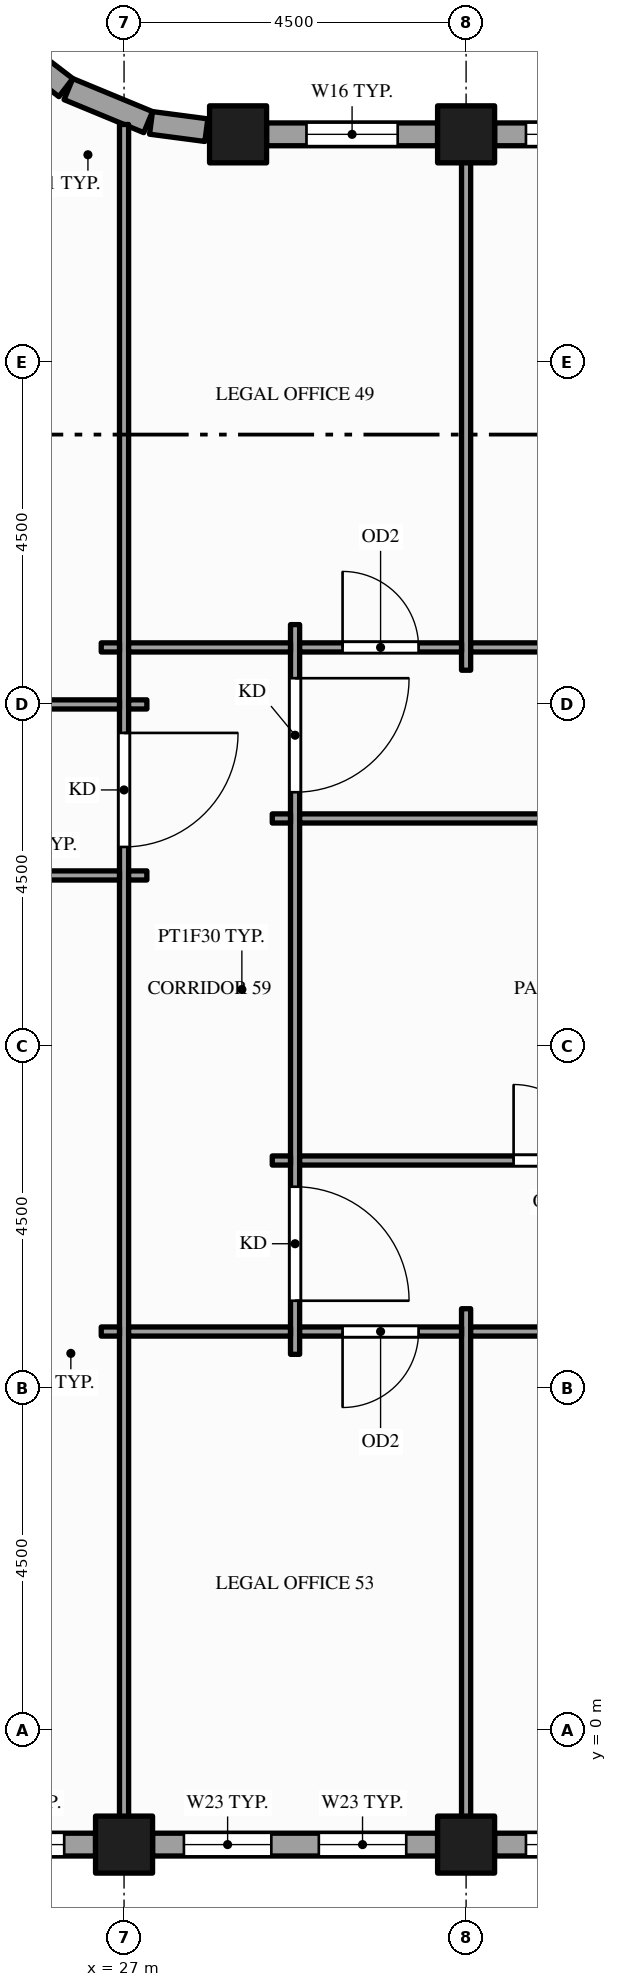
"""IFC4 building model, lengths in metres.
Left out: names, types, materials, properties, quantities, classifications, styles, units other than length and angle.
Written with IfcOpenShell. Run it as: python <this file> out.ifc"""

import sys

from ifc_helpers import new_model, si_unit, direction, frame, frame_2d, origin, origin_2d, place, context, subcontext, project, spatial, rectangle, hollow_rectangle, extrude, element, fill, save


model = new_model("IFC4")
c1 = context("Model", 3, precision=1e-05, world=origin(), true_north=direction((0.0, 1.0)))
c2 = subcontext(c1, "Body", "Model", "MODEL_VIEW")
j1 = project(units=[si_unit("LENGTHUNIT", "METRE"), si_unit("PLANEANGLEUNIT", "RADIAN")], contexts=[c1])
p1 = place(None, origin())
s1 = spatial("IfcSite", under=j1, at=p1, CompositionType="ELEMENT")
p2 = place(p1, origin())
s2 = spatial("IfcBuilding", under=s1, at=p2, CompositionType="ELEMENT")
p3 = place(p2, frame((0.0, 0.0, 211.0)))
s3 = spatial("IfcBuildingStorey", under=s2, at=p3, CompositionType="ELEMENT", Elevation=211.0)
for number, where, z_axis, x_axis in (
    (1, (27.0, -1.5, -0.15), (0.0, 0.0, 1.0), (1.0, 0.0, 0.0)),
    (2, (28.5, 21.0, -0.15), (0.0, 0.0, 1.0), (1.0, 0.0, 0.0)),
    (3, (31.5, -1.5, -0.15), (0.0, 0.0, 1.0), (1.0, 0.0, 0.0)),
    (4, (31.5, 21.0, -0.15), (0.0, 0.0, 1.0), (1.0, 0.0, 0.0)),
):
    element("IfcColumn", number, at=place(p3, frame(where, z_axis=z_axis, x_axis=x_axis)), inside=s3, PredefinedType="COLUMN", context=c2, shape_type="SweptSolid", body=[
        extrude(hollow_rectangle(XDim=0.75, YDim=0.75, WallThickness=0.036, at=origin_2d()), origin(), (0.0, 0.0, 1.0), 4.0),
    ])
p4 = place(p3, frame((22.875, -1.5, 0.0), z_axis=(0.0, 0.0, 1.0), x_axis=(1.0, 0.0, 0.0)))
e5 = element("IfcWall", 5, at=p4, inside=s3, PredefinedType="STANDARD", context=c2, shape_type="SweptSolid", body=[
    extrude(rectangle(XDim=3.75, YDim=0.3, at=frame_2d((1.875, 0.0))), origin(), (0.0, 0.0, 1.0), 2.76),
])
p5 = place(p4, frame((0.413, 0.0, 0.9)))
e6 = element("IfcOpeningElement", 6, at=p5, cuts=e5, PredefinedType="OPENING", context=c2, shape_type="SweptSolid", body=[
    extrude(rectangle(XDim=1.15, YDim=1.5, at=frame_2d((0.575, 0.75))), frame((0.0, 0.16, 0.0), z_axis=(0.0, -1.0, 0.0), x_axis=(1.0, 0.0, 0.0)), (0.0, 0.0, 1.0), 0.32),
])
p6 = place(p4, frame((2.188, 0.0, 0.9)))
e7 = element("IfcOpeningElement", 7, at=p6, cuts=e5, PredefinedType="OPENING", context=c2, shape_type="SweptSolid", body=[
    extrude(rectangle(XDim=1.15, YDim=1.5, at=frame_2d((0.575, 0.75))), frame((0.0, 0.16, 0.0), z_axis=(0.0, -1.0, 0.0), x_axis=(1.0, 0.0, 0.0)), (0.0, 0.0, 1.0), 0.32),
])
p7 = place(p3, frame((27.375, -1.5, 0.0), z_axis=(0.0, 0.0, 1.0), x_axis=(1.0, 0.0, 0.0)))
e8 = element("IfcWall", 8, at=p7, inside=s3, PredefinedType="STANDARD", context=c2, shape_type="SweptSolid", body=[
    extrude(rectangle(XDim=3.75, YDim=0.3, at=frame_2d((1.875, 0.0))), origin(), (0.0, 0.0, 1.0), 2.87),
])
p8 = place(p7, frame((0.413, 0.0, 0.9)))
e9 = element("IfcOpeningElement", 9, at=p8, cuts=e8, PredefinedType="OPENING", context=c2, shape_type="SweptSolid", body=[
    extrude(rectangle(XDim=1.15, YDim=1.75, at=frame_2d((0.575, 0.875))), frame((0.0, 0.16, 0.0), z_axis=(0.0, -1.0, 0.0), x_axis=(1.0, 0.0, 0.0)), (0.0, 0.0, 1.0), 0.32),
])
p9 = place(p7, frame((2.188, 0.0, 0.9)))
e10 = element("IfcOpeningElement", 10, at=p9, cuts=e8, PredefinedType="OPENING", context=c2, shape_type="SweptSolid", body=[
    extrude(rectangle(XDim=1.15, YDim=1.75, at=frame_2d((0.575, 0.875))), frame((0.0, 0.16, 0.0), z_axis=(0.0, -1.0, 0.0), x_axis=(1.0, 0.0, 0.0)), (0.0, 0.0, 1.0), 0.32),
])
p10 = place(p3, frame((31.875, -1.5, 0.0), z_axis=(0.0, 0.0, 1.0), x_axis=(1.0, 0.0, 0.0)))
e11 = element("IfcWall", 11, at=p10, inside=s3, PredefinedType="STANDARD", context=c2, shape_type="SweptSolid", body=[
    extrude(rectangle(XDim=3.75, YDim=0.3, at=frame_2d((1.875, 0.0))), origin(), (0.0, 0.0, 1.0), 2.87),
])
p11 = place(p10, frame((0.413, 0.0, 0.9)))
e12 = element("IfcOpeningElement", 12, at=p11, cuts=e11, PredefinedType="OPENING", context=c2, shape_type="SweptSolid", body=[
    extrude(rectangle(XDim=1.15, YDim=1.75, at=frame_2d((0.575, 0.875))), frame((0.0, 0.16, 0.0), z_axis=(0.0, -1.0, 0.0), x_axis=(1.0, 0.0, 0.0)), (0.0, 0.0, 1.0), 0.32),
])
p12 = place(p10, frame((2.188, 0.0, 0.9)))
e13 = element("IfcOpeningElement", 13, at=p12, cuts=e11, PredefinedType="OPENING", context=c2, shape_type="SweptSolid", body=[
    extrude(rectangle(XDim=1.15, YDim=1.75, at=frame_2d((0.575, 0.875))), frame((0.0, 0.16, 0.0), z_axis=(0.0, -1.0, 0.0), x_axis=(1.0, 0.0, 0.0)), (0.0, 0.0, 1.0), 0.32),
])
p13 = place(p3, frame((35.625, 21.0, 0.0), z_axis=(0.0, 0.0, 1.0), x_axis=(-1.0, 0.0, 0.0)))
e14 = element("IfcWall", 14, at=p13, inside=s3, PredefinedType="STANDARD", context=c2, shape_type="SweptSolid", body=[
    extrude(rectangle(XDim=3.75, YDim=0.3, at=frame_2d((1.875, 0.0))), origin(), (0.0, 0.0, 1.0), 2.87),
])
p14 = place(p13, frame((0.413, 0.0, 0.9)))
e15 = element("IfcOpeningElement", 15, at=p14, cuts=e14, PredefinedType="OPENING", context=c2, shape_type="SweptSolid", body=[
    extrude(rectangle(XDim=1.15, YDim=1.75, at=frame_2d((0.575, 0.875))), frame((0.0, 0.16, 0.0), z_axis=(0.0, -1.0, 0.0), x_axis=(1.0, 0.0, 0.0)), (0.0, 0.0, 1.0), 0.32),
])
p15 = place(p13, frame((2.188, 0.0, 0.9)))
e16 = element("IfcOpeningElement", 16, at=p15, cuts=e14, PredefinedType="OPENING", context=c2, shape_type="SweptSolid", body=[
    extrude(rectangle(XDim=1.15, YDim=1.75, at=frame_2d((0.575, 0.875))), frame((0.0, 0.16, 0.0), z_axis=(0.0, -1.0, 0.0), x_axis=(1.0, 0.0, 0.0)), (0.0, 0.0, 1.0), 0.32),
])
p16 = place(p3, frame((31.125, 21.0, 0.0), z_axis=(0.0, 0.0, 1.0), x_axis=(-1.0, 0.0, 0.0)))
e17 = element("IfcWall", 17, at=p16, inside=s3, PredefinedType="STANDARD", context=c2, shape_type="SweptSolid", body=[
    extrude(rectangle(XDim=2.25, YDim=0.3, at=frame_2d((1.125, 0.0))), origin(), (0.0, 0.0, 1.0), 2.87),
])
p17 = place(p16, frame((0.525, 0.0, 0.9)))
e18 = element("IfcOpeningElement", 18, at=p17, cuts=e17, PredefinedType="OPENING", context=c2, shape_type="SweptSolid", body=[
    extrude(rectangle(XDim=1.2, YDim=1.75, at=frame_2d((0.6, 0.875))), frame((0.0, 0.16, 0.0), z_axis=(0.0, -1.0, 0.0), x_axis=(1.0, 0.0, 0.0)), (0.0, 0.0, 1.0), 0.32),
])
p18 = place(p3, frame((28.083, 21.055, 0.0), z_axis=(0.0, 0.0, 1.0), x_axis=(-0.99142711513, 0.130660917588, 0.0)))
e19 = element("IfcWall", 19, at=p18, inside=s3, PredefinedType="STANDARD", context=c2, shape_type="SweptSolid", body=[
    extrude(rectangle(XDim=0.734, YDim=0.3, at=frame_2d((0.367, 0.0))), origin(), (0.0, 0.0, 1.0), 3.157),
])
p19 = place(p3, frame((27.317, 21.161, 0.0), z_axis=(0.0, 0.0, 1.0), x_axis=(-0.923914616768, 0.382598720491, 0.0)))
e20 = element("IfcWall", 20, at=p19, inside=s3, PredefinedType="STANDARD", context=c2, shape_type="SweptSolid", body=[
    extrude(rectangle(XDim=1.135, YDim=0.3, at=frame_2d((0.568, 0.0))), origin(), (0.0, 0.0, 1.0), 2.87),
])
p20 = place(p3, frame((26.234, 21.615, 0.0), z_axis=(0.0, 0.0, 1.0), x_axis=(-0.793575131083, 0.608472276547, 0.0)))
e21 = element("IfcWall", 21, at=p20, inside=s3, PredefinedType="STANDARD", context=c2, shape_type="SweptSolid", body=[
    extrude(rectangle(XDim=0.629, YDim=0.3, at=frame_2d((0.314, 0.0))), origin(), (0.0, 0.0, 1.0), 3.157),
])
p21 = place(p3, frame((27.0, -1.35, 0.0), z_axis=(0.0, 0.0, 1.0), x_axis=(0.0, 1.0, 0.0)))
e22 = element("IfcWall", 22, at=p21, inside=s3, PredefinedType="PARTITIONING", context=c2, shape_type="SweptSolid", body=[
    extrude(rectangle(XDim=22.48, YDim=0.12, at=frame_2d((11.24, 0.0))), origin(), (0.0, 0.0, 1.0), 2.87),
])
p22 = place(p21, frame((12.975, 0.0, 0.0)))
e23 = element("IfcOpeningElement", 23, at=p22, cuts=e22, PredefinedType="OPENING", context=c2, shape_type="SweptSolid", body=[
    extrude(rectangle(XDim=1.5, YDim=2.1, at=frame_2d((0.75, 1.05))), frame((0.0, 0.07, 0.0), z_axis=(0.0, -1.0, 0.0), x_axis=(1.0, 0.0, 0.0)), (0.0, 0.0, 1.0), 0.14),
])
p23 = place(p3, frame((29.25, 4.95, 0.0), z_axis=(0.0, 0.0, 1.0), x_axis=(0.0, 1.0, 0.0)))
e24 = element("IfcWall", 24, at=p23, inside=s3, PredefinedType="PARTITIONING", context=c2, shape_type="SweptSolid", body=[
    extrude(rectangle(XDim=9.6, YDim=0.12, at=frame_2d((4.8, 0.0))), origin(), (0.0, 0.0, 1.0), 2.87),
])
p24 = place(p23, frame((0.705, 0.0, 0.0)))
e25 = element("IfcOpeningElement", 25, at=p24, cuts=e24, PredefinedType="OPENING", context=c2, shape_type="SweptSolid", body=[
    extrude(rectangle(XDim=1.5, YDim=2.1, at=frame_2d((0.75, 1.05))), frame((0.0, 0.07, 0.0), z_axis=(0.0, -1.0, 0.0), x_axis=(1.0, 0.0, 0.0)), (0.0, 0.0, 1.0), 0.14),
])
p25 = place(p23, frame((7.395, 0.0, 0.0)))
e26 = element("IfcOpeningElement", 26, at=p25, cuts=e24, PredefinedType="OPENING", context=c2, shape_type="SweptSolid", body=[
    extrude(rectangle(XDim=1.5, YDim=2.1, at=frame_2d((0.75, 1.05))), frame((0.0, 0.07, 0.0), z_axis=(0.0, -1.0, 0.0), x_axis=(1.0, 0.0, 0.0)), (0.0, 0.0, 1.0), 0.14),
])
for number, where, z_axis, x_axis in (
    (27, (31.5, -1.35, 0.0), (0.0, 0.0, 1.0), (0.0, 1.0, 0.0)),
    (28, (31.5, 13.95, 0.0), (0.0, 0.0, 1.0), (0.0, 1.0, 0.0)),
):
    element("IfcWall", number, at=place(p3, frame(where, z_axis=z_axis, x_axis=x_axis)), inside=s3, PredefinedType="PARTITIONING", context=c2, shape_type="SweptSolid", body=[
        extrude(rectangle(XDim=6.9, YDim=0.12, at=frame_2d((3.45, 0.0))), origin(), (0.0, 0.0, 1.0), 2.87),
    ])
p26 = place(p3, frame((26.7, 5.25, 0.0), z_axis=(0.0, 0.0, 1.0), x_axis=(1.0, 0.0, 0.0)))
e29 = element("IfcWall", 29, at=p26, inside=s3, PredefinedType="PARTITIONING", context=c2, shape_type="SweptSolid", body=[
    extrude(rectangle(XDim=0.24, YDim=0.12, at=frame_2d((0.12, 0.0))), origin(), (0.0, 0.0, 1.0), 2.87),
])
p27 = place(p3, frame((27.06, 5.25, 0.0), z_axis=(0.0, 0.0, 1.0), x_axis=(1.0, 0.0, 0.0)))
e30 = element("IfcWall", 30, at=p27, inside=s3, PredefinedType="PARTITIONING", context=c2, shape_type="SweptSolid", body=[
    extrude(rectangle(XDim=2.13, YDim=0.12, at=frame_2d((1.065, 0.0))), origin(), (0.0, 0.0, 1.0), 2.87),
])
p28 = place(p3, frame((29.31, 5.25, 0.0), z_axis=(0.0, 0.0, 1.0), x_axis=(1.0, 0.0, 0.0)))
e31 = element("IfcWall", 31, at=p28, inside=s3, PredefinedType="PARTITIONING", context=c2, shape_type="SweptSolid", body=[
    extrude(rectangle(XDim=2.13, YDim=0.12, at=frame_2d((1.065, 0.0))), origin(), (0.0, 0.0, 1.0), 2.87),
])
p29 = place(p28, frame((0.565, 0.0, 0.0)))
e32 = element("IfcOpeningElement", 32, at=p29, cuts=e31, PredefinedType="OPENING", context=c2, shape_type="SweptSolid", body=[
    extrude(rectangle(XDim=1.0, YDim=2.1, at=frame_2d((0.5, 1.05))), frame((0.0, 0.07, 0.0), z_axis=(0.0, -1.0, 0.0), x_axis=(1.0, 0.0, 0.0)), (0.0, 0.0, 1.0), 0.14),
])
p30 = place(p3, frame((31.56, 5.25, 0.0), z_axis=(0.0, 0.0, 1.0), x_axis=(1.0, 0.0, 0.0)))
e33 = element("IfcWall", 33, at=p30, inside=s3, PredefinedType="PARTITIONING", context=c2, shape_type="SweptSolid", body=[
    extrude(rectangle(XDim=4.38, YDim=0.12, at=frame_2d((2.19, 0.0))), origin(), (0.0, 0.0, 1.0), 2.87),
])
p31 = place(p30, frame((1.69, 0.0, 0.0)))
e34 = element("IfcOpeningElement", 34, at=p31, cuts=e33, PredefinedType="OPENING", context=c2, shape_type="SweptSolid", body=[
    extrude(rectangle(XDim=1.0, YDim=2.1, at=frame_2d((0.5, 1.05))), frame((0.0, 0.07, 0.0), z_axis=(0.0, -1.0, 0.0), x_axis=(1.0, 0.0, 0.0)), (0.0, 0.0, 1.0), 0.14),
])
p32 = place(p3, frame((28.95, 7.5, 0.0), z_axis=(0.0, 0.0, 1.0), x_axis=(1.0, 0.0, 0.0)))
e35 = element("IfcWall", 35, at=p32, inside=s3, PredefinedType="PARTITIONING", context=c2, shape_type="SweptSolid", body=[
    extrude(rectangle(XDim=0.24, YDim=0.12, at=frame_2d((0.12, 0.0))), origin(), (0.0, 0.0, 1.0), 2.87),
])
p33 = place(p3, frame((29.31, 7.5, 0.0), z_axis=(0.0, 0.0, 1.0), x_axis=(1.0, 0.0, 0.0)))
e36 = element("IfcWall", 36, at=p33, inside=s3, PredefinedType="PARTITIONING", context=c2, shape_type="SweptSolid", body=[
    extrude(rectangle(XDim=6.63, YDim=0.12, at=frame_2d((3.315, 0.0))), origin(), (0.0, 0.0, 1.0), 2.87),
])
p34 = place(p33, frame((2.815, 0.0, 0.0)))
e37 = element("IfcOpeningElement", 37, at=p34, cuts=e36, PredefinedType="OPENING", context=c2, shape_type="SweptSolid", body=[
    extrude(rectangle(XDim=1.0, YDim=2.1, at=frame_2d((0.5, 1.05))), frame((0.0, 0.07, 0.0), z_axis=(0.0, -1.0, 0.0), x_axis=(1.0, 0.0, 0.0)), (0.0, 0.0, 1.0), 0.14),
])
p35 = place(p3, frame((20.31, 11.25, 0.0), z_axis=(0.0, 0.0, 1.0), x_axis=(1.0, 0.0, 0.0)))
e38 = element("IfcWall", 38, at=p35, inside=s3, PredefinedType="PARTITIONING", context=c2, shape_type="SweptSolid", body=[
    extrude(rectangle(XDim=6.63, YDim=0.12, at=frame_2d((3.315, 0.0))), origin(), (0.0, 0.0, 1.0), 2.76),
])
p36 = place(p35, frame((2.865, 0.0, 0.0)))
e39 = element("IfcOpeningElement", 39, at=p36, cuts=e38, PredefinedType="OPENING", context=c2, shape_type="SweptSolid", body=[
    extrude(rectangle(XDim=0.9, YDim=2.1, at=frame_2d((0.45, 1.05))), frame((0.0, 0.07, 0.0), z_axis=(0.0, -1.0, 0.0), x_axis=(1.0, 0.0, 0.0)), (0.0, 0.0, 1.0), 0.14),
])
for number, where, z_axis, x_axis in (
    (40, (27.06, 11.25, 0.0), (0.0, 0.0, 1.0), (1.0, 0.0, 0.0)),
    (41, (28.95, 12.0, 0.0), (0.0, 0.0, 1.0), (1.0, 0.0, 0.0)),
):
    element("IfcWall", number, at=place(p3, frame(where, z_axis=z_axis, x_axis=x_axis)), inside=s3, PredefinedType="PARTITIONING", context=c2, shape_type="SweptSolid", body=[
        extrude(rectangle(XDim=0.24, YDim=0.12, at=frame_2d((0.12, 0.0))), origin(), (0.0, 0.0, 1.0), 2.87),
    ])
p37 = place(p3, frame((29.31, 12.0, 0.0), z_axis=(0.0, 0.0, 1.0), x_axis=(1.0, 0.0, 0.0)))
e42 = element("IfcWall", 42, at=p37, inside=s3, PredefinedType="PARTITIONING", context=c2, shape_type="SweptSolid", body=[
    extrude(rectangle(XDim=6.63, YDim=0.12, at=frame_2d((3.315, 0.0))), origin(), (0.0, 0.0, 1.0), 2.87),
])
p38 = place(p3, frame((13.56, 13.5, 0.0), z_axis=(0.0, 0.0, 1.0), x_axis=(1.0, 0.0, 0.0)))
e43 = element("IfcWall", 43, at=p38, inside=s3, PredefinedType="PARTITIONING", context=c2, shape_type="SweptSolid", body=[
    extrude(rectangle(XDim=13.38, YDim=0.12, at=frame_2d((6.69, 0.0))), origin(), (0.0, 0.0, 1.0), 2.76),
])
p39 = place(p38, frame((3.54, 0.0, 0.0)))
e44 = element("IfcOpeningElement", 44, at=p39, cuts=e43, PredefinedType="OPENING", context=c2, shape_type="SweptSolid", body=[
    extrude(rectangle(XDim=1.8, YDim=2.1, at=frame_2d((0.9, 1.05))), frame((0.0, 0.07, 0.0), z_axis=(0.0, -1.0, 0.0), x_axis=(1.0, 0.0, 0.0)), (0.0, 0.0, 1.0), 0.14),
])
for number, where, z_axis, x_axis in (
    (45, (27.06, 13.5, 0.0), (0.0, 0.0, 1.0), (1.0, 0.0, 0.0)),
    (46, (26.7, 14.25, 0.0), (0.0, 0.0, 1.0), (1.0, 0.0, 0.0)),
):
    element("IfcWall", number, at=place(p3, frame(where, z_axis=z_axis, x_axis=x_axis)), inside=s3, PredefinedType="PARTITIONING", context=c2, shape_type="SweptSolid", body=[
        extrude(rectangle(XDim=0.24, YDim=0.12, at=frame_2d((0.12, 0.0))), origin(), (0.0, 0.0, 1.0), 2.87),
    ])
p40 = place(p3, frame((27.06, 14.25, 0.0), z_axis=(0.0, 0.0, 1.0), x_axis=(1.0, 0.0, 0.0)))
e47 = element("IfcWall", 47, at=p40, inside=s3, PredefinedType="PARTITIONING", context=c2, shape_type="SweptSolid", body=[
    extrude(rectangle(XDim=2.13, YDim=0.12, at=frame_2d((1.065, 0.0))), origin(), (0.0, 0.0, 1.0), 2.87),
])
p41 = place(p3, frame((29.31, 14.25, 0.0), z_axis=(0.0, 0.0, 1.0), x_axis=(1.0, 0.0, 0.0)))
e48 = element("IfcWall", 48, at=p41, inside=s3, PredefinedType="PARTITIONING", context=c2, shape_type="SweptSolid", body=[
    extrude(rectangle(XDim=2.13, YDim=0.12, at=frame_2d((1.065, 0.0))), origin(), (0.0, 0.0, 1.0), 2.87),
])
p42 = place(p41, frame((0.565, 0.0, 0.0)))
e49 = element("IfcOpeningElement", 49, at=p42, cuts=e48, PredefinedType="OPENING", context=c2, shape_type="SweptSolid", body=[
    extrude(rectangle(XDim=1.0, YDim=2.1, at=frame_2d((0.5, 1.05))), frame((0.0, 0.07, 0.0), z_axis=(0.0, -1.0, 0.0), x_axis=(1.0, 0.0, 0.0)), (0.0, 0.0, 1.0), 0.14),
])
p43 = place(p3, frame((31.56, 14.25, 0.0), z_axis=(0.0, 0.0, 1.0), x_axis=(1.0, 0.0, 0.0)))
e50 = element("IfcWall", 50, at=p43, inside=s3, PredefinedType="PARTITIONING", context=c2, shape_type="SweptSolid", body=[
    extrude(rectangle(XDim=4.38, YDim=0.12, at=frame_2d((2.19, 0.0))), origin(), (0.0, 0.0, 1.0), 2.87),
])
p44 = place(p43, frame((1.69, 0.0, 0.0)))
e51 = element("IfcOpeningElement", 51, at=p44, cuts=e50, PredefinedType="OPENING", context=c2, shape_type="SweptSolid", body=[
    extrude(rectangle(XDim=1.0, YDim=2.1, at=frame_2d((0.5, 1.05))), frame((0.0, 0.07, 0.0), z_axis=(0.0, -1.0, 0.0), x_axis=(1.0, 0.0, 0.0)), (0.0, 0.0, 1.0), 0.14),
])
p45 = place(p6, origin())
e52 = element("IfcWindow", 52, at=p45, inside=s3, PartitioningType="SINGLE_PANEL", PredefinedType="WINDOW", context=c2, shape_type="SweptSolid", body=[
    extrude(rectangle(XDim=1.15, YDim=1.5, at=frame_2d((0.575, 0.75))), frame((0.0, 0.03, 0.0), z_axis=(0.0, -1.0, 0.0), x_axis=(1.0, 0.0, 0.0)), (0.0, 0.0, 1.0), 0.06),
])
fill(e7, e52)
p46 = place(p8, origin())
e53 = element("IfcWindow", 53, at=p46, inside=s3, PartitioningType="SINGLE_PANEL", PredefinedType="WINDOW", context=c2, shape_type="SweptSolid", body=[
    extrude(rectangle(XDim=1.15, YDim=1.75, at=frame_2d((0.575, 0.875))), frame((0.0, 0.03, 0.0), z_axis=(0.0, -1.0, 0.0), x_axis=(1.0, 0.0, 0.0)), (0.0, 0.0, 1.0), 0.06),
])
fill(e9, e53)
p47 = place(p9, origin())
e54 = element("IfcWindow", 54, at=p47, inside=s3, PartitioningType="SINGLE_PANEL", PredefinedType="WINDOW", context=c2, shape_type="SweptSolid", body=[
    extrude(rectangle(XDim=1.15, YDim=1.75, at=frame_2d((0.575, 0.875))), frame((0.0, 0.03, 0.0), z_axis=(0.0, -1.0, 0.0), x_axis=(1.0, 0.0, 0.0)), (0.0, 0.0, 1.0), 0.06),
])
fill(e10, e54)
p48 = place(p11, origin())
e55 = element("IfcWindow", 55, at=p48, inside=s3, PartitioningType="SINGLE_PANEL", PredefinedType="WINDOW", context=c2, shape_type="SweptSolid", body=[
    extrude(rectangle(XDim=1.15, YDim=1.75, at=frame_2d((0.575, 0.875))), frame((0.0, 0.03, 0.0), z_axis=(0.0, -1.0, 0.0), x_axis=(1.0, 0.0, 0.0)), (0.0, 0.0, 1.0), 0.06),
])
fill(e12, e55)
p49 = place(p15, origin())
e56 = element("IfcWindow", 56, at=p49, inside=s3, PartitioningType="SINGLE_PANEL", PredefinedType="WINDOW", context=c2, shape_type="SweptSolid", body=[
    extrude(rectangle(XDim=1.15, YDim=1.75, at=frame_2d((0.575, 0.875))), frame((0.0, 0.03, 0.0), z_axis=(0.0, -1.0, 0.0), x_axis=(1.0, 0.0, 0.0)), (0.0, 0.0, 1.0), 0.06),
])
fill(e16, e56)
p50 = place(p17, origin())
e57 = element("IfcWindow", 57, at=p50, inside=s3, PartitioningType="SINGLE_PANEL", PredefinedType="WINDOW", context=c2, shape_type="SweptSolid", body=[
    extrude(rectangle(XDim=1.2, YDim=1.75, at=frame_2d((0.6, 0.875))), frame((0.0, 0.03, 0.0), z_axis=(0.0, -1.0, 0.0), x_axis=(1.0, 0.0, 0.0)), (0.0, 0.0, 1.0), 0.06),
])
fill(e18, e57)
p51 = place(p22, origin())
e58 = element("IfcDoor", 58, at=p51, inside=s3, OperationType="SINGLE_SWING_RIGHT", PredefinedType="DOOR", context=c2, shape_type="SweptSolid", body=[
    extrude(rectangle(XDim=1.5, YDim=2.1, at=frame_2d((0.75, 1.05))), frame((0.0, 0.025, 0.0), z_axis=(0.0, -1.0, 0.0), x_axis=(1.0, 0.0, 0.0)), (0.0, 0.0, 1.0), 0.05),
])
fill(e23, e58)
p52 = place(p24, origin())
e59 = element("IfcDoor", 59, at=p52, inside=s3, OperationType="SINGLE_SWING_LEFT", PredefinedType="DOOR", context=c2, shape_type="SweptSolid", body=[
    extrude(rectangle(XDim=1.5, YDim=2.1, at=frame_2d((0.75, 1.05))), frame((0.0, 0.025, 0.0), z_axis=(0.0, -1.0, 0.0), x_axis=(1.0, 0.0, 0.0)), (0.0, 0.0, 1.0), 0.05),
])
fill(e25, e59)
p53 = place(p25, origin())
e60 = element("IfcDoor", 60, at=p53, inside=s3, OperationType="SINGLE_SWING_RIGHT", PredefinedType="DOOR", context=c2, shape_type="SweptSolid", body=[
    extrude(rectangle(XDim=1.5, YDim=2.1, at=frame_2d((0.75, 1.05))), frame((0.0, 0.025, 0.0), z_axis=(0.0, -1.0, 0.0), x_axis=(1.0, 0.0, 0.0)), (0.0, 0.0, 1.0), 0.05),
])
fill(e26, e60)
p54 = place(p34, origin())
e61 = element("IfcDoor", 61, at=p54, inside=s3, OperationType="SINGLE_SWING_LEFT", PredefinedType="DOOR", context=c2, shape_type="SweptSolid", body=[
    extrude(rectangle(XDim=1.0, YDim=2.1, at=frame_2d((0.5, 1.05))), frame((0.0, 0.025, 0.0), z_axis=(0.0, -1.0, 0.0), x_axis=(1.0, 0.0, 0.0)), (0.0, 0.0, 1.0), 0.05),
])
fill(e37, e61)
p55 = place(p29, origin())
e62 = element("IfcDoor", 62, at=p55, inside=s3, OperationType="SINGLE_SWING_LEFT", PredefinedType="DOOR", context=c2, shape_type="SweptSolid", body=[
    extrude(rectangle(XDim=1.0, YDim=2.1, at=frame_2d((0.5, 1.05))), frame((0.0, 0.025, 0.0), z_axis=(0.0, -1.0, 0.0), x_axis=(1.0, 0.0, 0.0)), (0.0, 0.0, 1.0), 0.05),
])
fill(e32, e62)
p56 = place(p42, origin())
e63 = element("IfcDoor", 63, at=p56, inside=s3, OperationType="SINGLE_SWING_LEFT", PredefinedType="DOOR", context=c2, shape_type="SweptSolid", body=[
    extrude(rectangle(XDim=1.0, YDim=2.1, at=frame_2d((0.5, 1.05))), frame((0.0, 0.025, 0.0), z_axis=(0.0, -1.0, 0.0), x_axis=(1.0, 0.0, 0.0)), (0.0, 0.0, 1.0), 0.05),
])
fill(e49, e63)
save(model, sys.argv[1])
